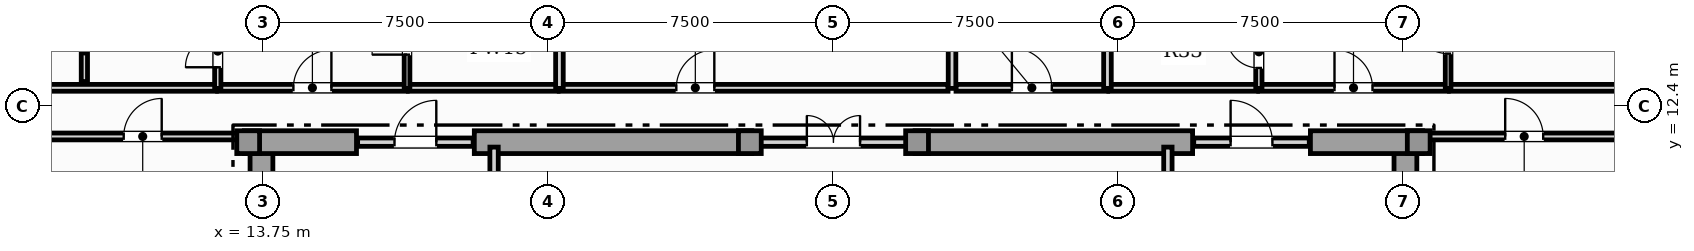
"""IFC4 building model, lengths in metres.
Left out: names, types, materials, properties, quantities, classifications, styles, units other than length and angle.
Written with IfcOpenShell. Run it as: python <this file> out.ifc"""

import sys

from ifc_helpers import new_model, si_unit, direction, frame, frame_2d, origin, origin_2d, place, context, subcontext, project, spatial, rectangle, extrude, element, fill, save


model = new_model("IFC4")
c1 = context("Model", 3, precision=1e-05, world=origin(), true_north=direction((0.0, 1.0)))
c2 = subcontext(c1, "Body", "Model", "MODEL_VIEW")
j1 = project(units=[si_unit("LENGTHUNIT", "METRE"), si_unit("PLANEANGLEUNIT", "RADIAN")], contexts=[c1])
p1 = place(None, origin())
s1 = spatial("IfcSite", under=j1, at=p1, CompositionType="ELEMENT")
p2 = place(p1, origin())
s2 = spatial("IfcBuilding", under=s1, at=p2, CompositionType="ELEMENT")
p3 = place(p2, frame((0.0, 0.0, 251.7)))
s3 = spatial("IfcBuildingStorey", under=s2, at=p3, CompositionType="ELEMENT", Elevation=251.7)
for number, where, z_axis, x_axis in (
    (1, (13.7, 0.92, 0.0), (0.0, 0.0, 1.0), (0.0, 1.0, 0.0)),
    (2, (43.8, 0.92, 0.0), (0.0, 0.0, 1.0), (0.0, 1.0, 0.0)),
):
    element("IfcWall", number, at=place(p3, frame(where, z_axis=z_axis, x_axis=x_axis)), inside=s3, PredefinedType="SHEAR", context=c2, shape_type="SweptSolid", body=[
        extrude(rectangle(XDim=10.53, YDim=0.6, at=frame_2d((5.265, 0.0))), origin(), (0.0, 0.0, 1.0), 4.85),
    ])
p4 = place(p3, frame((13.25, 11.45, 0.0), z_axis=(0.0, 0.0, 1.0), x_axis=(1.0, 0.0, 0.0)))
e3 = element("IfcWall", 3, at=p4, inside=s3, PredefinedType="SHEAR", context=c2, shape_type="SweptSolid", body=[
    extrude(rectangle(XDim=2.95, YDim=0.6, at=frame_2d((1.475, 0.0))), origin(), (0.0, 0.0, 1.0), 4.85),
])
for number, where, z_axis, x_axis in (
    (4, (19.3, 11.45, 0.0), (0.0, 0.0, 1.0), (1.0, 0.0, 0.0)),
    (5, (30.9, 11.45, 0.0), (0.0, 0.0, 1.0), (1.0, 0.0, 0.0)),
):
    element("IfcWall", number, at=place(p3, frame(where, z_axis=z_axis, x_axis=x_axis)), inside=s3, PredefinedType="SHEAR", context=c2, shape_type="SweptSolid", body=[
        extrude(rectangle(XDim=7.3, YDim=0.6, at=frame_2d((3.65, 0.0))), origin(), (0.0, 0.0, 1.0), 4.85),
    ])
p5 = place(p3, frame((41.3, 11.45, 0.0), z_axis=(0.0, 0.0, 1.0), x_axis=(1.0, 0.0, 0.0)))
e6 = element("IfcWall", 6, at=p5, inside=s3, PredefinedType="SHEAR", context=c2, shape_type="SweptSolid", body=[
    extrude(rectangle(XDim=2.95, YDim=0.6, at=frame_2d((1.475, 0.0))), origin(), (0.0, 0.0, 1.0), 4.85),
])
for number, where, z_axis, x_axis in (
    (7, (13.35, 11.45, 0.0), (0.0, 0.0, 1.0), (1.0, 0.0, 0.0)),
    (8, (44.15, 11.45, 0.0), (0.0, 0.0, 1.0), (1.0, 0.0, 0.0)),
    (9, (26.55, 11.45, 0.0), (0.0, 0.0, 1.0), (1.0, 0.0, 0.0)),
    (10, (30.95, 11.45, 0.0), (0.0, 0.0, 1.0), (1.0, 0.0, 0.0)),
):
    element("IfcColumn", number, at=place(p3, frame(where, z_axis=z_axis, x_axis=x_axis)), inside=s3, PredefinedType="COLUMN", context=c2, shape_type="SweptSolid", body=[
        extrude(rectangle(XDim=0.6, YDim=0.6, at=origin_2d()), origin(), (0.0, 0.0, 1.0), 5.05),
    ])
p6 = place(p3, frame((19.82, 8.52, 0.0), z_axis=(0.0, 0.0, 1.0), x_axis=(0.0, 1.0, 0.0)))
e11 = element("IfcWall", 11, at=p6, inside=s3, PredefinedType="SOLIDWALL", context=c2, shape_type="SweptSolid", body=[
    extrude(rectangle(XDim=2.8, YDim=0.22, at=frame_2d((1.4, 0.0))), origin(), (0.0, 0.0, 1.0), 4.306),
])
p7 = place(p6, frame((0.85, 0.0, 0.0)))
e12 = element("IfcOpeningElement", 12, at=p7, cuts=e11, PredefinedType="OPENING", context=c2, shape_type="SweptSolid", body=[
    extrude(rectangle(XDim=1.1, YDim=2.2, at=frame_2d((0.55, 1.1))), frame((0.0, 0.12, 0.0), z_axis=(0.0, -1.0, 0.0), x_axis=(1.0, 0.0, 0.0)), (0.0, 0.0, 1.0), 0.24),
])
p8 = place(p3, frame((37.55, 8.52, 0.0), z_axis=(0.0, 0.0, 1.0), x_axis=(0.0, 1.0, 0.0)))
e13 = element("IfcWall", 13, at=p8, inside=s3, PredefinedType="SOLIDWALL", context=c2, shape_type="SweptSolid", body=[
    extrude(rectangle(XDim=2.8, YDim=0.22, at=frame_2d((1.4, 0.0))), origin(), (0.0, 0.0, 1.0), 4.306),
])
p9 = place(p8, frame((0.85, 0.0, 0.0)))
e14 = element("IfcOpeningElement", 14, at=p9, cuts=e13, PredefinedType="OPENING", context=c2, shape_type="SweptSolid", body=[
    extrude(rectangle(XDim=1.1, YDim=2.2, at=frame_2d((0.55, 1.1))), frame((0.0, 0.12, 0.0), z_axis=(0.0, -1.0, 0.0), x_axis=(1.0, 0.0, 0.0)), (0.0, 0.0, 1.0), 0.24),
])
p10 = place(p3, frame((16.23, 11.45, 0.0), z_axis=(0.0, 0.0, 1.0), x_axis=(1.0, 0.0, 0.0)))
e15 = element("IfcWall", 15, at=p10, inside=s3, PredefinedType="SOLIDWALL", context=c2, shape_type="SweptSolid", body=[
    extrude(rectangle(XDim=3.04, YDim=0.22, at=frame_2d((1.52, 0.0))), origin(), (0.0, 0.0, 1.0), 4.85),
])
p11 = place(p10, frame((0.97, 0.0, 0.0)))
e16 = element("IfcOpeningElement", 16, at=p11, cuts=e15, PredefinedType="OPENING", context=c2, shape_type="SweptSolid", body=[
    extrude(rectangle(XDim=1.1, YDim=2.2, at=frame_2d((0.55, 1.1))), frame((0.0, 0.12, 0.0), z_axis=(0.0, -1.0, 0.0), x_axis=(1.0, 0.0, 0.0)), (0.0, 0.0, 1.0), 0.24),
])
p12 = place(p3, frame((26.63, 11.45, 0.0), z_axis=(0.0, 0.0, 1.0), x_axis=(1.0, 0.0, 0.0)))
e17 = element("IfcWall", 17, at=p12, inside=s3, PredefinedType="SOLIDWALL", context=c2, shape_type="SweptSolid", body=[
    extrude(rectangle(XDim=4.24, YDim=0.22, at=frame_2d((2.12, 0.0))), origin(), (0.0, 0.0, 1.0), 4.85),
])
p13 = place(p12, frame((1.42, 0.0, 0.0)))
e18 = element("IfcOpeningElement", 18, at=p13, cuts=e17, PredefinedType="OPENING", context=c2, shape_type="SweptSolid", body=[
    extrude(rectangle(XDim=1.4, YDim=2.2, at=frame_2d((0.7, 1.1))), frame((0.0, 0.12, 0.0), z_axis=(0.0, -1.0, 0.0), x_axis=(1.0, 0.0, 0.0)), (0.0, 0.0, 1.0), 0.24),
])
p14 = place(p3, frame((38.23, 11.45, 0.0), z_axis=(0.0, 0.0, 1.0), x_axis=(1.0, 0.0, 0.0)))
e19 = element("IfcWall", 19, at=p14, inside=s3, PredefinedType="SOLIDWALL", context=c2, shape_type="SweptSolid", body=[
    extrude(rectangle(XDim=3.04, YDim=0.22, at=frame_2d((1.52, 0.0))), origin(), (0.0, 0.0, 1.0), 4.85),
])
p15 = place(p14, frame((0.97, 0.0, 0.0)))
e20 = element("IfcOpeningElement", 20, at=p15, cuts=e19, PredefinedType="OPENING", context=c2, shape_type="SweptSolid", body=[
    extrude(rectangle(XDim=1.1, YDim=2.2, at=frame_2d((0.55, 1.1))), frame((0.0, 0.12, 0.0), z_axis=(0.0, -1.0, 0.0), x_axis=(1.0, 0.0, 0.0)), (0.0, 0.0, 1.0), 0.24),
])
p16 = place(p3, frame((8.005, 11.6, 0.0), z_axis=(0.0, 0.0, 1.0), x_axis=(1.0, 0.0, 0.0)))
e21 = element("IfcWall", 21, at=p16, inside=s3, PredefinedType="PARTITIONING", context=c2, shape_type="SweptSolid", body=[
    extrude(rectangle(XDim=5.14, YDim=0.18, at=frame_2d((2.57, 0.0))), origin(), (0.0, 0.0, 1.0), 4.85),
])
p17 = place(p16, frame((2.07, 0.0, 0.0)))
e22 = element("IfcOpeningElement", 22, at=p17, cuts=e21, PredefinedType="OPENING", context=c2, shape_type="SweptSolid", body=[
    extrude(rectangle(XDim=1.0, YDim=2.15, at=frame_2d((0.5, 1.075))), frame((0.0, 0.1, 0.0), z_axis=(0.0, -1.0, 0.0), x_axis=(1.0, 0.0, 0.0)), (0.0, 0.0, 1.0), 0.2),
])
p18 = place(p3, frame((44.355, 11.6, 0.0), z_axis=(0.0, 0.0, 1.0), x_axis=(1.0, 0.0, 0.0)))
e23 = element("IfcWall", 23, at=p18, inside=s3, PredefinedType="PARTITIONING", context=c2, shape_type="SweptSolid", body=[
    extrude(rectangle(XDim=5.14, YDim=0.18, at=frame_2d((2.57, 0.0))), origin(), (0.0, 0.0, 1.0), 4.85),
])
p19 = place(p18, frame((2.07, 0.0, 0.0)))
e24 = element("IfcOpeningElement", 24, at=p19, cuts=e23, PredefinedType="OPENING", context=c2, shape_type="SweptSolid", body=[
    extrude(rectangle(XDim=1.0, YDim=2.15, at=frame_2d((0.5, 1.075))), frame((0.0, 0.1, 0.0), z_axis=(0.0, -1.0, 0.0), x_axis=(1.0, 0.0, 0.0)), (0.0, 0.0, 1.0), 0.2),
])
p20 = place(p3, frame((21.535, 12.88, 0.0), z_axis=(0.0, 0.0, 1.0), x_axis=(1.0, 0.0, 0.0)))
e25 = element("IfcWall", 25, at=p20, inside=s3, PredefinedType="PARTITIONING", context=c2, shape_type="SweptSolid", body=[
    extrude(rectangle(XDim=10.23, YDim=0.18, at=frame_2d((5.115, 0.0))), origin(), (0.0, 0.0, 1.0), 4.85),
])
p21 = place(p20, frame((3.081, 0.0, 0.0)))
e26 = element("IfcOpeningElement", 26, at=p21, cuts=e25, PredefinedType="OPENING", context=c2, shape_type="SweptSolid", body=[
    extrude(rectangle(XDim=1.0, YDim=2.15, at=frame_2d((0.5, 1.075))), frame((0.0, 0.1, 0.0), z_axis=(0.0, -1.0, 0.0), x_axis=(1.0, 0.0, 0.0)), (0.0, 0.0, 1.0), 0.2),
])
p22 = place(p3, frame((31.975, 12.88, 0.0), z_axis=(0.0, 0.0, 1.0), x_axis=(1.0, 0.0, 0.0)))
e27 = element("IfcWall", 27, at=p22, inside=s3, PredefinedType="PARTITIONING", context=c2, shape_type="SweptSolid", body=[
    extrude(rectangle(XDim=3.99, YDim=0.18, at=frame_2d((1.995, 0.0))), origin(), (0.0, 0.0, 1.0), 4.85),
])
p23 = place(p22, frame((1.47, 0.0, 0.0)))
e28 = element("IfcOpeningElement", 28, at=p23, cuts=e27, PredefinedType="OPENING", context=c2, shape_type="SweptSolid", body=[
    extrude(rectangle(XDim=1.05, YDim=2.15, at=frame_2d((0.525, 1.075))), frame((0.0, 0.1, 0.0), z_axis=(0.0, -1.0, 0.0), x_axis=(1.0, 0.0, 0.0)), (0.0, 0.0, 1.0), 0.2),
])
p24 = place(p3, frame((12.545, 12.88, 0.0), z_axis=(0.0, 0.0, 1.0), x_axis=(1.0, 0.0, 0.0)))
e29 = element("IfcWall", 29, at=p24, inside=s3, PredefinedType="PARTITIONING", context=c2, shape_type="SweptSolid", body=[
    extrude(rectangle(XDim=4.99, YDim=0.18, at=frame_2d((2.495, 0.0))), origin(), (0.0, 0.0, 1.0), 4.85),
])
p25 = place(p24, frame((1.995, 0.0, 0.0)))
e30 = element("IfcOpeningElement", 30, at=p25, cuts=e29, PredefinedType="OPENING", context=c2, shape_type="SweptSolid", body=[
    extrude(rectangle(XDim=1.0, YDim=2.15, at=frame_2d((0.5, 1.075))), frame((0.0, 0.1, 0.0), z_axis=(0.0, -1.0, 0.0), x_axis=(1.0, 0.0, 0.0)), (0.0, 0.0, 1.0), 0.2),
])
p26 = place(p3, frame((8.005, 12.88, 0.0), z_axis=(0.0, 0.0, 1.0), x_axis=(1.0, 0.0, 0.0)))
e31 = element("IfcWall", 31, at=p26, inside=s3, PredefinedType="PARTITIONING", context=c2, shape_type="SweptSolid", body=[
    extrude(rectangle(XDim=4.51, YDim=0.18, at=frame_2d((2.255, 0.0))), origin(), (0.0, 0.0, 1.0), 4.85),
])
p27 = place(p3, frame((17.565, 12.88, 0.0), z_axis=(0.0, 0.0, 1.0), x_axis=(1.0, 0.0, 0.0)))
e32 = element("IfcWall", 32, at=p27, inside=s3, PredefinedType="PARTITIONING", context=c2, shape_type="SweptSolid", body=[
    extrude(rectangle(XDim=3.94, YDim=0.18, at=frame_2d((1.97, 0.0))), origin(), (0.0, 0.0, 1.0), 4.85),
])
p28 = place(p3, frame((39.939, 12.88, 0.0), z_axis=(0.0, 0.0, 1.0), x_axis=(1.0, 0.0, 0.0)))
e33 = element("IfcWall", 33, at=p28, inside=s3, PredefinedType="PARTITIONING", context=c2, shape_type="SweptSolid", body=[
    extrude(rectangle(XDim=4.99, YDim=0.18, at=frame_2d((2.495, 0.0))), origin(), (0.0, 0.0, 1.0), 4.85),
])
p29 = place(p28, frame((1.995, 0.0, 0.0)))
e34 = element("IfcOpeningElement", 34, at=p29, cuts=e33, PredefinedType="OPENING", context=c2, shape_type="SweptSolid", body=[
    extrude(rectangle(XDim=1.0, YDim=2.15, at=frame_2d((0.5, 1.075))), frame((0.0, 0.1, 0.0), z_axis=(0.0, -1.0, 0.0), x_axis=(1.0, 0.0, 0.0)), (0.0, 0.0, 1.0), 0.2),
])
p30 = place(p3, frame((35.995, 12.88, 0.0), z_axis=(0.0, 0.0, 1.0), x_axis=(1.0, 0.0, 0.0)))
e35 = element("IfcWall", 35, at=p30, inside=s3, PredefinedType="PARTITIONING", context=c2, shape_type="SweptSolid", body=[
    extrude(rectangle(XDim=3.914, YDim=0.18, at=frame_2d((1.957, 0.0))), origin(), (0.0, 0.0, 1.0), 4.85),
])
p31 = place(p3, frame((44.959, 12.88, 0.0), z_axis=(0.0, 0.0, 1.0), x_axis=(1.0, 0.0, 0.0)))
e36 = element("IfcWall", 36, at=p31, inside=s3, PredefinedType="PARTITIONING", context=c2, shape_type="SweptSolid", body=[
    extrude(rectangle(XDim=4.536, YDim=0.18, at=frame_2d((2.268, 0.0))), origin(), (0.0, 0.0, 1.0), 4.85),
])
p32 = place(p3, frame((31.87, 12.865, 0.0), z_axis=(0.0, 0.0, 1.0), x_axis=(0.0, 1.0, 0.0)))
e37 = element("IfcWall", 37, at=p32, inside=s3, PredefinedType="PARTITIONING", context=c2, shape_type="SweptSolid", body=[
    extrude(rectangle(XDim=4.69, YDim=0.2, at=frame_2d((2.345, 0.0))), origin(), (0.0, 0.0, 1.0), 4.85),
])
p33 = place(p3, frame((21.54, 12.865, 0.0), z_axis=(0.0, 0.0, 1.0), x_axis=(0.0, 1.0, 0.0)))
e38 = element("IfcWall", 38, at=p33, inside=s3, PredefinedType="PARTITIONING", context=c2, shape_type="SweptSolid", body=[
    extrude(rectangle(XDim=2.697, YDim=0.2, at=frame_2d((1.348, 0.0))), origin(), (0.0, 0.0, 1.0), 4.85),
])
p34 = place(p3, frame((35.96, 12.865, 0.0), z_axis=(0.0, 0.0, 1.0), x_axis=(0.0, 1.0, 0.0)))
e39 = element("IfcWall", 39, at=p34, inside=s3, PredefinedType="PARTITIONING", context=c2, shape_type="SweptSolid", body=[
    extrude(rectangle(XDim=1.925, YDim=0.2, at=frame_2d((0.963, 0.0))), origin(), (0.0, 0.0, 1.0), 4.85),
])
p35 = place(p3, frame((12.55, 12.865, 0.0), z_axis=(0.0, 0.0, 1.0), x_axis=(0.0, 1.0, 0.0)))
e40 = element("IfcWall", 40, at=p35, inside=s3, PredefinedType="PLUMBINGWALL", context=c2, shape_type="SweptSolid", body=[
    extrude(rectangle(XDim=1.962, YDim=0.165, at=frame_2d((0.981, 0.0))), origin(), (0.0, 0.0, 1.0), 4.85),
])
p36 = place(p35, frame((0.556, 0.0, 0.0)))
e41 = element("IfcOpeningElement", 41, at=p36, cuts=e40, PredefinedType="OPENING", context=c2, shape_type="SweptSolid", body=[
    extrude(rectangle(XDim=0.85, YDim=2.1, at=frame_2d((0.425, 1.05))), frame((0.0, 0.093, 0.0), z_axis=(0.0, -1.0, 0.0), x_axis=(1.0, 0.0, 0.0)), (0.0, 0.0, 1.0), 0.185),
])
p37 = place(p3, frame((17.53, 12.865, 0.0), z_axis=(0.0, 0.0, 1.0), x_axis=(0.0, 1.0, 0.0)))
e42 = element("IfcWall", 42, at=p37, inside=s3, PredefinedType="PARTITIONING", context=c2, shape_type="SweptSolid", body=[
    extrude(rectangle(XDim=2.697, YDim=0.15, at=frame_2d((1.348, 0.0))), origin(), (0.0, 0.0, 1.0), 4.85),
])
p38 = place(p37, frame((0.888, 0.0, 0.0)))
e43 = element("IfcOpeningElement", 43, at=p38, cuts=e42, PredefinedType="OPENING", context=c2, shape_type="SweptSolid", body=[
    extrude(rectangle(XDim=0.92, YDim=2.1, at=frame_2d((0.46, 1.05))), frame((0.0, 0.085, 0.0), z_axis=(0.0, -1.0, 0.0), x_axis=(1.0, 0.0, 0.0)), (0.0, 0.0, 1.0), 0.17),
])
p39 = place(p3, frame((39.944, 12.865, 0.0), z_axis=(0.0, 0.0, 1.0), x_axis=(0.0, 1.0, 0.0)))
e44 = element("IfcWall", 44, at=p39, inside=s3, PredefinedType="PLUMBINGWALL", context=c2, shape_type="SweptSolid", body=[
    extrude(rectangle(XDim=1.925, YDim=0.165, at=frame_2d((0.963, 0.0))), origin(), (0.0, 0.0, 1.0), 4.85),
])
p40 = place(p39, frame((0.538, 0.0, 0.0)))
e45 = element("IfcOpeningElement", 45, at=p40, cuts=e44, PredefinedType="OPENING", context=c2, shape_type="SweptSolid", body=[
    extrude(rectangle(XDim=0.85, YDim=2.1, at=frame_2d((0.425, 1.05))), frame((0.0, 0.093, 0.0), z_axis=(0.0, -1.0, 0.0), x_axis=(1.0, 0.0, 0.0)), (0.0, 0.0, 1.0), 0.185),
])
p41 = place(p3, frame((44.924, 12.865, 0.0), z_axis=(0.0, 0.0, 1.0), x_axis=(0.0, 1.0, 0.0)))
e46 = element("IfcWall", 46, at=p41, inside=s3, PredefinedType="PARTITIONING", context=c2, shape_type="SweptSolid", body=[
    extrude(rectangle(XDim=2.75, YDim=0.15, at=frame_2d((1.375, 0.0))), origin(), (0.0, 0.0, 1.0), 4.85),
])
p42 = place(p41, frame((0.915, 0.0, 0.0)))
e47 = element("IfcOpeningElement", 47, at=p42, cuts=e46, PredefinedType="OPENING", context=c2, shape_type="SweptSolid", body=[
    extrude(rectangle(XDim=0.92, YDim=2.1, at=frame_2d((0.46, 1.05))), frame((0.0, 0.085, 0.0), z_axis=(0.0, -1.0, 0.0), x_axis=(1.0, 0.0, 0.0)), (0.0, 0.0, 1.0), 0.17),
])
p43 = place(p3, frame((9.04, 13.045, 0.0), z_axis=(0.0, 0.0, 1.0), x_axis=(0.0, 1.0, 0.0)))
e48 = element("IfcWall", 48, at=p43, inside=s3, PredefinedType="PLUMBINGWALL", context=c2, shape_type="SweptSolid", body=[
    extrude(rectangle(XDim=1.612, YDim=0.165, at=frame_2d((0.806, 0.0))), origin(), (0.0, 0.0, 1.0), 4.85),
])
p44 = place(p11, origin())
e49 = element("IfcDoor", 49, at=p44, inside=s3, OperationType="SINGLE_SWING_RIGHT", PredefinedType="DOOR", context=c2, shape_type="SweptSolid", body=[
    extrude(rectangle(XDim=1.1, YDim=2.2, at=frame_2d((0.55, 1.1))), frame((0.0, 0.025, 0.0), z_axis=(0.0, -1.0, 0.0), x_axis=(1.0, 0.0, 0.0)), (0.0, 0.0, 1.0), 0.05),
])
fill(e16, e49)
p45 = place(p13, origin())
e50 = element("IfcDoor", 50, at=p45, inside=s3, OperationType="DOUBLE_DOOR_SINGLE_SWING", PredefinedType="DOOR", context=c2, shape_type="SweptSolid", body=[
    extrude(rectangle(XDim=1.4, YDim=2.2, at=frame_2d((0.7, 1.1))), frame((0.0, 0.025, 0.0), z_axis=(0.0, -1.0, 0.0), x_axis=(1.0, 0.0, 0.0)), (0.0, 0.0, 1.0), 0.05),
])
fill(e18, e50)
p46 = place(p15, origin())
e51 = element("IfcDoor", 51, at=p46, inside=s3, OperationType="SINGLE_SWING_LEFT", PredefinedType="DOOR", context=c2, shape_type="SweptSolid", body=[
    extrude(rectangle(XDim=1.1, YDim=2.2, at=frame_2d((0.55, 1.1))), frame((0.0, 0.025, 0.0), z_axis=(0.0, -1.0, 0.0), x_axis=(1.0, 0.0, 0.0)), (0.0, 0.0, 1.0), 0.05),
])
fill(e20, e51)
p47 = place(p17, origin())
e52 = element("IfcDoor", 52, at=p47, inside=s3, OperationType="SINGLE_SWING_RIGHT", PredefinedType="DOOR", context=c2, shape_type="SweptSolid", body=[
    extrude(rectangle(XDim=1.0, YDim=2.15, at=frame_2d((0.5, 1.075))), frame((0.0, 0.025, 0.0), z_axis=(0.0, -1.0, 0.0), x_axis=(1.0, 0.0, 0.0)), (0.0, 0.0, 1.0), 0.05),
])
fill(e22, e52)
p48 = place(p19, origin())
e53 = element("IfcDoor", 53, at=p48, inside=s3, OperationType="SINGLE_SWING_LEFT", PredefinedType="DOOR", context=c2, shape_type="SweptSolid", body=[
    extrude(rectangle(XDim=1.0, YDim=2.15, at=frame_2d((0.5, 1.075))), frame((0.0, 0.025, 0.0), z_axis=(0.0, -1.0, 0.0), x_axis=(1.0, 0.0, 0.0)), (0.0, 0.0, 1.0), 0.05),
])
fill(e24, e53)
p49 = place(p21, origin())
e54 = element("IfcDoor", 54, at=p49, inside=s3, OperationType="SINGLE_SWING_RIGHT", PredefinedType="DOOR", context=c2, shape_type="SweptSolid", body=[
    extrude(rectangle(XDim=1.0, YDim=2.15, at=frame_2d((0.5, 1.075))), frame((0.0, 0.025, 0.0), z_axis=(0.0, -1.0, 0.0), x_axis=(1.0, 0.0, 0.0)), (0.0, 0.0, 1.0), 0.05),
])
fill(e26, e54)
p50 = place(p23, origin())
e55 = element("IfcDoor", 55, at=p50, inside=s3, OperationType="SINGLE_SWING_LEFT", PredefinedType="DOOR", context=c2, shape_type="SweptSolid", body=[
    extrude(rectangle(XDim=1.05, YDim=2.15, at=frame_2d((0.525, 1.075))), frame((0.0, 0.025, 0.0), z_axis=(0.0, -1.0, 0.0), x_axis=(1.0, 0.0, 0.0)), (0.0, 0.0, 1.0), 0.05),
])
fill(e28, e55)
p51 = place(p25, origin())
e56 = element("IfcDoor", 56, at=p51, inside=s3, OperationType="SINGLE_SWING_RIGHT", PredefinedType="DOOR", context=c2, shape_type="SweptSolid", body=[
    extrude(rectangle(XDim=1.0, YDim=2.15, at=frame_2d((0.5, 1.075))), frame((0.0, 0.025, 0.0), z_axis=(0.0, -1.0, 0.0), x_axis=(1.0, 0.0, 0.0)), (0.0, 0.0, 1.0), 0.05),
])
fill(e30, e56)
p52 = place(p29, origin())
e57 = element("IfcDoor", 57, at=p52, inside=s3, OperationType="SINGLE_SWING_LEFT", PredefinedType="DOOR", context=c2, shape_type="SweptSolid", body=[
    extrude(rectangle(XDim=1.0, YDim=2.15, at=frame_2d((0.5, 1.075))), frame((0.0, 0.025, 0.0), z_axis=(0.0, -1.0, 0.0), x_axis=(1.0, 0.0, 0.0)), (0.0, 0.0, 1.0), 0.05),
])
fill(e34, e57)
p53 = place(p36, origin())
e58 = element("IfcDoor", 58, at=p53, inside=s3, OperationType="SINGLE_SWING_LEFT", PredefinedType="DOOR", context=c2, shape_type="SweptSolid", body=[
    extrude(rectangle(XDim=0.85, YDim=2.1, at=frame_2d((0.425, 1.05))), frame((0.0, 0.025, 0.0), z_axis=(0.0, -1.0, 0.0), x_axis=(1.0, 0.0, 0.0)), (0.0, 0.0, 1.0), 0.05),
])
fill(e41, e58)
p54 = place(p38, origin())
e59 = element("IfcDoor", 59, at=p54, inside=s3, OperationType="SINGLE_SWING_LEFT", PredefinedType="DOOR", context=c2, shape_type="SweptSolid", body=[
    extrude(rectangle(XDim=0.92, YDim=2.1, at=frame_2d((0.46, 1.05))), frame((0.0, 0.025, 0.0), z_axis=(0.0, -1.0, 0.0), x_axis=(1.0, 0.0, 0.0)), (0.0, 0.0, 1.0), 0.05),
])
fill(e43, e59)
p55 = place(p40, origin())
e60 = element("IfcDoor", 60, at=p55, inside=s3, OperationType="SINGLE_SWING_RIGHT", PredefinedType="DOOR", context=c2, shape_type="SweptSolid", body=[
    extrude(rectangle(XDim=0.85, YDim=2.1, at=frame_2d((0.425, 1.05))), frame((0.0, 0.025, 0.0), z_axis=(0.0, -1.0, 0.0), x_axis=(1.0, 0.0, 0.0)), (0.0, 0.0, 1.0), 0.05),
])
fill(e45, e60)
p56 = place(p42, origin())
e61 = element("IfcDoor", 61, at=p56, inside=s3, OperationType="SINGLE_SWING_RIGHT", PredefinedType="DOOR", context=c2, shape_type="SweptSolid", body=[
    extrude(rectangle(XDim=0.92, YDim=2.1, at=frame_2d((0.46, 1.05))), frame((0.0, 0.025, 0.0), z_axis=(0.0, -1.0, 0.0), x_axis=(1.0, 0.0, 0.0)), (0.0, 0.0, 1.0), 0.05),
])
fill(e47, e61)
save(model, sys.argv[1])
